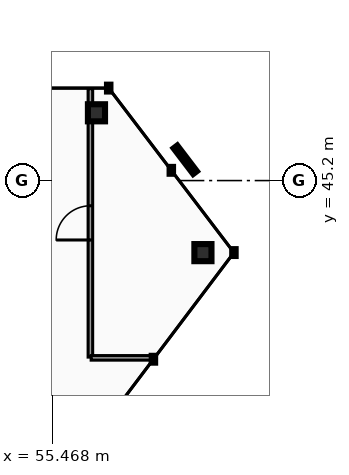
"""IFC4 building model, lengths in metres.
Left out: names, types, materials, properties, quantities, classifications, styles, units other than length and angle.
Written with IfcOpenShell. Run it as: python <this file> out.ifc"""

import sys

from ifc_helpers import new_model, si_unit, direction, frame, frame_2d, origin, origin_2d, place, context, subcontext, project, spatial, rectangle, hollow_rectangle, extrude, element, fill, save


model = new_model("IFC4")
c1 = context("Model", 3, precision=1e-05, world=origin(), true_north=direction((0.0, 1.0)))
c2 = subcontext(c1, "Body", "Model", "MODEL_VIEW")
j1 = project(units=[si_unit("LENGTHUNIT", "METRE"), si_unit("PLANEANGLEUNIT", "RADIAN")], contexts=[c1])
p1 = place(None, origin())
s1 = spatial("IfcSite", under=j1, at=p1, CompositionType="ELEMENT")
p2 = place(p1, origin())
s2 = spatial("IfcBuilding", under=s1, at=p2, CompositionType="ELEMENT")
p3 = place(p2, frame((0.0, 0.0, 285.6)))
s3 = spatial("IfcBuildingStorey", under=s2, at=p3, CompositionType="ELEMENT", Elevation=285.6)
p4 = place(p3, frame((56.633, 46.983, 0.0), z_axis=(-0.062026602014, -0.036603352793, 0.997403075595), x_axis=(0.508227729214, -0.861222721053, 0.0)))
e1 = element("IfcColumn", 1, at=p4, inside=s3, PredefinedType="COLUMN", context=c2, shape_type="SweptSolid", body=[
    extrude(hollow_rectangle(XDim=0.45, YDim=0.45, WallThickness=0.022, at=origin_2d()), origin(), (0.0, 0.0, 1.0), 3.188),
])
p5 = place(p3, frame((59.435, 43.304, 0.0), z_axis=(-0.161482423706, 0.098608314756, 0.981936773471), x_axis=(-0.521159878983, -0.853459067875, 0.0)))
e2 = element("IfcColumn", 2, at=p5, inside=s3, PredefinedType="COLUMN", context=c2, shape_type="SweptSolid", body=[
    extrude(hollow_rectangle(XDim=0.45, YDim=0.45, WallThickness=0.022, at=origin_2d()), origin(), (0.0, 0.0, 1.0), 3.239),
])
p6 = place(p3, frame((56.473, 40.555, 0.0), z_axis=(0.0, 0.0, 1.0), x_axis=(0.0, 1.0, 0.0)))
e3 = element("IfcWall", 3, at=p6, inside=s3, PredefinedType="PARTITIONING", context=c2, shape_type="SweptSolid", body=[
    extrude(rectangle(XDim=7.063, YDim=0.12, at=frame_2d((3.532, 0.0))), origin(), (0.0, 0.0, 1.0), 2.235),
])
p7 = place(p6, frame((3.082, 0.0, 0.0)))
e4 = element("IfcOpeningElement", 4, at=p7, cuts=e3, PredefinedType="OPENING", context=c2, shape_type="SweptSolid", body=[
    extrude(rectangle(XDim=0.9, YDim=2.05, at=frame_2d((0.45, 1.025))), frame((0.0, 0.07, 0.0), z_axis=(0.0, -1.0, 0.0), x_axis=(1.0, 0.0, 0.0)), (0.0, 0.0, 1.0), 0.14),
])
p8 = place(p3, frame((56.493, 40.535, 0.0), z_axis=(0.0, 0.0, 1.0), x_axis=(1.0, 0.0, 0.0)))
e5 = element("IfcWall", 5, at=p8, inside=s3, PredefinedType="PARTITIONING", context=c2, shape_type="SweptSolid", body=[
    extrude(rectangle(XDim=1.651, YDim=0.12, at=frame_2d((0.825, 0.0))), origin(), (0.0, 0.0, 1.0), 2.235),
])
p9 = place(p7, origin())
e6 = element("IfcDoor", 6, at=p9, inside=s3, OperationType="SINGLE_SWING_LEFT", PredefinedType="DOOR", context=c2, shape_type="SweptSolid", body=[
    extrude(rectangle(XDim=0.9, YDim=2.05, at=frame_2d((0.45, 1.025))), frame((0.0, 0.025, 0.0), z_axis=(0.0, -1.0, 0.0), x_axis=(1.0, 0.0, 0.0)), (0.0, 0.0, 1.0), 0.05),
])
fill(e4, e6)
save(model, sys.argv[1])
